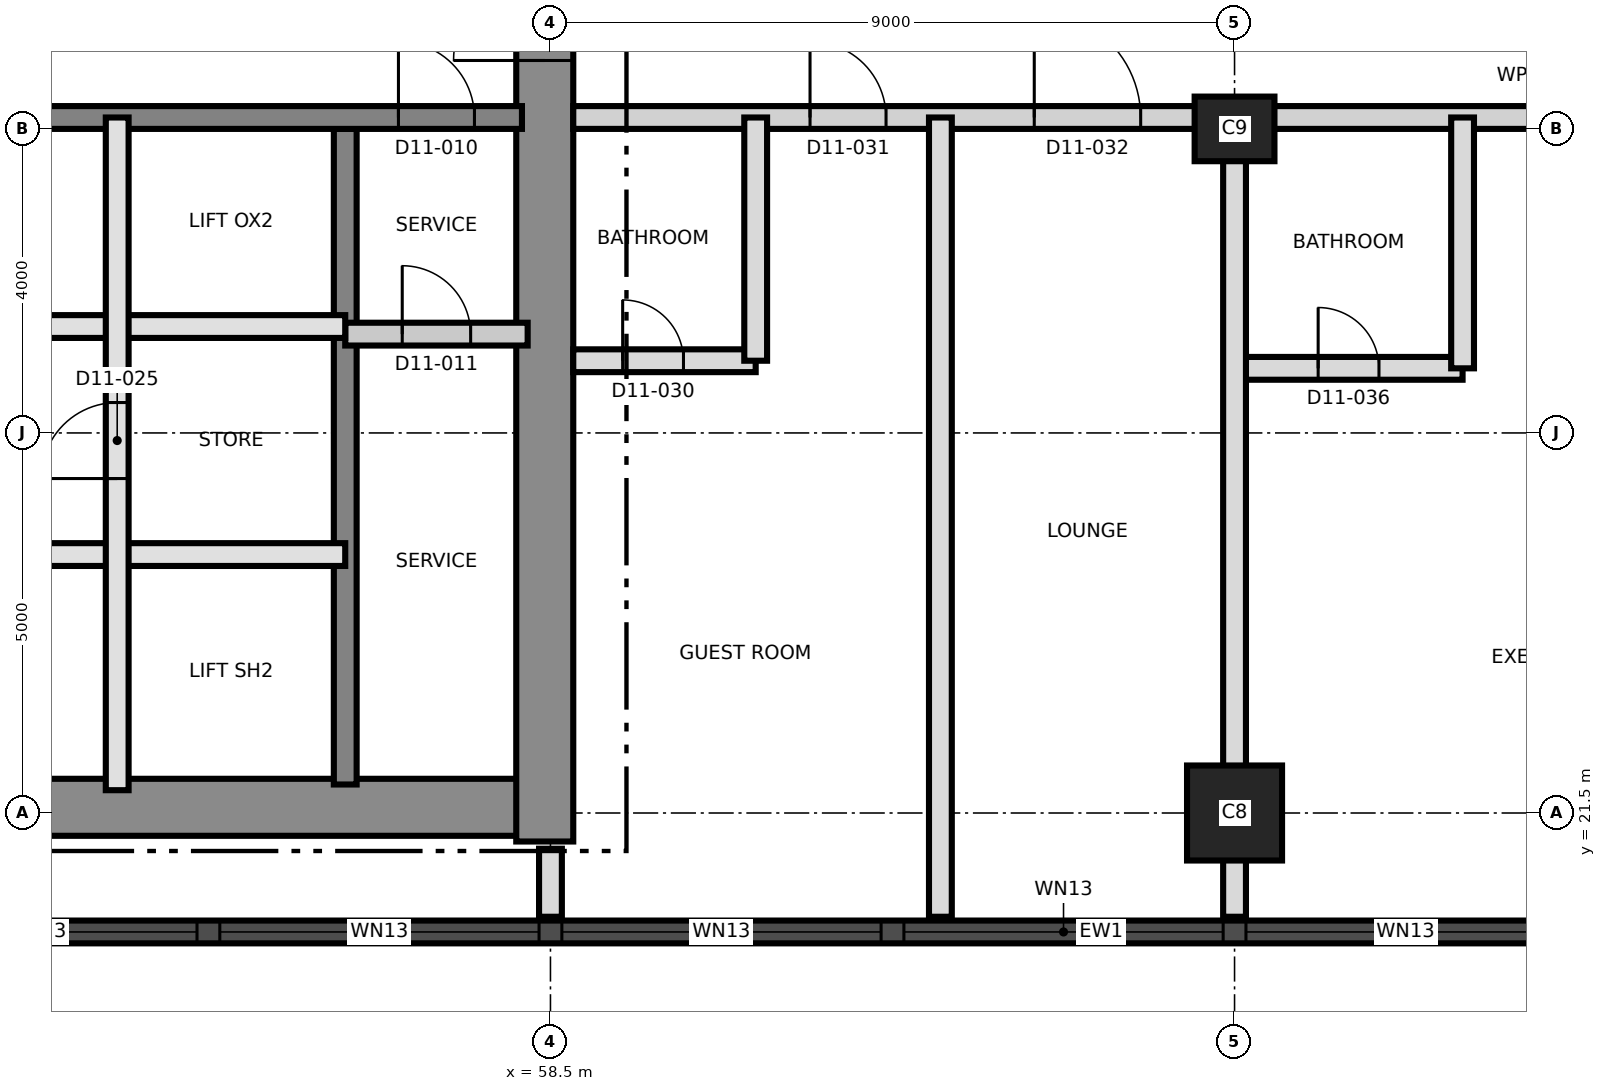
"""IFC4 building model, lengths in metres.
Left out: names, types, materials, properties, quantities, classifications, styles, units other than length and angle.
Written with IfcOpenShell. Run it as: python <this file> out.ifc"""

import sys

from ifc_helpers import new_model, si_unit, direction, frame, frame_2d, origin, origin_2d, place, context, subcontext, project, spatial, rectangle, extrude, element, fill, save


model = new_model("IFC4")
c1 = context("Model", 3, precision=1e-05, world=origin(), true_north=direction((0.0, 1.0)))
c2 = subcontext(c1, "Body", "Model", "MODEL_VIEW")
j1 = project(units=[si_unit("LENGTHUNIT", "METRE"), si_unit("PLANEANGLEUNIT", "RADIAN")], contexts=[c1])
p1 = place(None, origin())
s1 = spatial("IfcSite", under=j1, at=p1, CompositionType="ELEMENT")
p2 = place(p1, origin())
s2 = spatial("IfcBuilding", under=s1, at=p2, CompositionType="ELEMENT")
p3 = place(p2, frame((0.0, 0.0, 124.1)))
s3 = spatial("IfcBuildingStorey", under=s2, at=p3, CompositionType="ELEMENT", Elevation=124.1)
p4 = place(p3, frame((31.125, 21.575, 0.0), z_axis=(0.0, 0.0, 1.0), x_axis=(1.0, 0.0, 0.0)))
e1 = element("IfcWall", 1, at=p4, inside=s3, PredefinedType="SHEAR", context=c2, shape_type="SweptSolid", body=[
    extrude(rectangle(XDim=27.0, YDim=0.75, at=frame_2d((13.5, 0.0))), origin(), (0.0, 0.0, 1.0), 3.7),
])
p5 = place(p3, frame((58.425, 21.125, 0.0), z_axis=(0.0, 0.0, 1.0), x_axis=(0.0, 1.0, 0.0)))
e2 = element("IfcWall", 2, at=p5, inside=s3, PredefinedType="SHEAR", context=c2, shape_type="SweptSolid", body=[
    extrude(rectangle(XDim=18.75, YDim=0.75, at=frame_2d((9.375, 0.0))), origin(), (0.0, 0.0, 1.0), 3.7),
])
p6 = place(p5, frame((10.275, 0.0, 0.0)))
e3 = element("IfcOpeningElement", 3, at=p6, cuts=e2, PredefinedType="OPENING", context=c2, shape_type="SweptSolid", body=[
    extrude(rectangle(XDim=1.2, YDim=2.1, at=frame_2d((0.6, 1.05))), frame((0.0, 0.385, 0.0), z_axis=(0.0, -1.0, 0.0), x_axis=(1.0, 0.0, 0.0)), (0.0, 0.0, 1.0), 0.77),
])
p7 = place(p3, frame((55.8, 21.875, 0.0), z_axis=(0.0, 0.0, 1.0), x_axis=(0.0, 1.0, 0.0)))
e4 = element("IfcWall", 4, at=p7, inside=s3, PredefinedType="SHEAR", context=c2, shape_type="SweptSolid", body=[
    extrude(rectangle(XDim=8.625, YDim=0.3, at=frame_2d((4.312, 0.0))), origin(), (0.0, 0.0, 1.0), 3.7),
])
p8 = place(p3, frame((31.875, 30.65, 0.0), z_axis=(0.0, 0.0, 1.0), x_axis=(1.0, 0.0, 0.0)))
e5 = element("IfcWall", 5, at=p8, inside=s3, PredefinedType="SHEAR", context=c2, shape_type="SweptSolid", body=[
    extrude(rectangle(XDim=26.25, YDim=0.3, at=frame_2d((13.125, 0.0))), origin(), (0.0, 0.0, 1.0), 3.7),
])
p9 = place(p8, frame((24.625, 0.0, 0.0)))
e6 = element("IfcOpeningElement", 6, at=p9, cuts=e5, PredefinedType="OPENING", context=c2, shape_type="SweptSolid", body=[
    extrude(rectangle(XDim=1.0, YDim=2.1, at=frame_2d((0.5, 1.05))), frame((0.0, 0.16, 0.0), z_axis=(0.0, -1.0, 0.0), x_axis=(1.0, 0.0, 0.0)), (0.0, 0.0, 1.0), 0.32),
])
p10 = place(p8, frame((11.425, 0.0, 0.0)))
e7 = element("IfcOpeningElement", 7, at=p10, cuts=e5, PredefinedType="OPENING", context=c2, shape_type="SweptSolid", body=[
    extrude(rectangle(XDim=1.0, YDim=2.1, at=frame_2d((0.5, 1.05))), frame((0.0, 0.16, 0.0), z_axis=(0.0, -1.0, 0.0), x_axis=(1.0, 0.0, 0.0)), (0.0, 0.0, 1.0), 0.32),
])
p11 = place(p3, frame((67.5, 21.5, 0.0), z_axis=(0.0, 0.0, 1.0), x_axis=(1.0, 0.0, 0.0)))
e8 = element("IfcColumn", 8, at=p11, inside=s3, PredefinedType="COLUMN", context=c2, shape_type="SweptSolid", body=[
    extrude(rectangle(XDim=1.25, YDim=1.25, at=origin_2d()), origin(), (0.0, 0.0, 1.0), 3.7),
])
p12 = place(p3, frame((67.5, 30.5, 0.0), z_axis=(0.0, 0.0, 1.0), x_axis=(1.0, 0.0, 0.0)))
e9 = element("IfcColumn", 9, at=p12, inside=s3, PredefinedType="COLUMN", context=c2, shape_type="SweptSolid", body=[
    extrude(rectangle(XDim=1.05, YDim=0.85, at=origin_2d()), origin(), (0.0, 0.0, 1.0), 3.7),
])
p13 = place(p3, frame((44.01, 19.935, 0.0), z_axis=(0.0, 0.0, 1.0), x_axis=(1.0, 0.0, 0.0)))
e10 = element("IfcWall", 10, at=p13, inside=s3, PredefinedType="SOLIDWALL", context=c2, shape_type="SweptSolid", body=[
    extrude(rectangle(XDim=43.477, YDim=0.3, at=frame_2d((21.738, 0.0))), origin(), (0.0, 0.0, 1.0), 3.4),
])
p14 = place(p13, frame((1.845, 0.0, 0.3)))
e11 = element("IfcOpeningElement", 11, at=p14, cuts=e10, PredefinedType="OPENING", context=c2, shape_type="SweptSolid", body=[
    extrude(rectangle(XDim=1.8, YDim=2.4, at=frame_2d((0.9, 1.2))), frame((0.0, 0.16, 0.0), z_axis=(0.0, -1.0, 0.0), x_axis=(1.0, 0.0, 0.0)), (0.0, 0.0, 1.0), 0.32),
])
p15 = place(p13, frame((5.64, 0.0, 0.9)))
e12 = element("IfcOpeningElement", 12, at=p15, cuts=e10, PredefinedType="OPENING", context=c2, shape_type="SweptSolid", body=[
    extrude(rectangle(XDim=4.2, YDim=1.7, at=frame_2d((2.1, 0.85))), frame((0.0, 0.16, 0.0), z_axis=(0.0, -1.0, 0.0), x_axis=(1.0, 0.0, 0.0)), (0.0, 0.0, 1.0), 0.32),
])
p16 = place(p13, frame((10.14, 0.0, 0.9)))
e13 = element("IfcOpeningElement", 13, at=p16, cuts=e10, PredefinedType="OPENING", context=c2, shape_type="SweptSolid", body=[
    extrude(rectangle(XDim=4.2, YDim=1.7, at=frame_2d((2.1, 0.85))), frame((0.0, 0.16, 0.0), z_axis=(0.0, -1.0, 0.0), x_axis=(1.0, 0.0, 0.0)), (0.0, 0.0, 1.0), 0.32),
])
p17 = place(p13, frame((14.64, 0.0, 0.9)))
e14 = element("IfcOpeningElement", 14, at=p17, cuts=e10, PredefinedType="OPENING", context=c2, shape_type="SweptSolid", body=[
    extrude(rectangle(XDim=4.2, YDim=1.7, at=frame_2d((2.1, 0.85))), frame((0.0, 0.16, 0.0), z_axis=(0.0, -1.0, 0.0), x_axis=(1.0, 0.0, 0.0)), (0.0, 0.0, 1.0), 0.32),
])
p18 = place(p13, frame((19.14, 0.0, 0.9)))
e15 = element("IfcOpeningElement", 15, at=p18, cuts=e10, PredefinedType="OPENING", context=c2, shape_type="SweptSolid", body=[
    extrude(rectangle(XDim=4.2, YDim=1.7, at=frame_2d((2.1, 0.85))), frame((0.0, 0.16, 0.0), z_axis=(0.0, -1.0, 0.0), x_axis=(1.0, 0.0, 0.0)), (0.0, 0.0, 1.0), 0.32),
])
p19 = place(p13, frame((23.64, 0.0, 0.9)))
e16 = element("IfcOpeningElement", 16, at=p19, cuts=e10, PredefinedType="OPENING", context=c2, shape_type="SweptSolid", body=[
    extrude(rectangle(XDim=4.2, YDim=1.7, at=frame_2d((2.1, 0.85))), frame((0.0, 0.16, 0.0), z_axis=(0.0, -1.0, 0.0), x_axis=(1.0, 0.0, 0.0)), (0.0, 0.0, 1.0), 0.32),
])
p20 = place(p13, frame((28.14, 0.0, 0.9)))
e17 = element("IfcOpeningElement", 17, at=p20, cuts=e10, PredefinedType="OPENING", context=c2, shape_type="SweptSolid", body=[
    extrude(rectangle(XDim=4.2, YDim=1.7, at=frame_2d((2.1, 0.85))), frame((0.0, 0.16, 0.0), z_axis=(0.0, -1.0, 0.0), x_axis=(1.0, 0.0, 0.0)), (0.0, 0.0, 1.0), 0.32),
])
p21 = place(p13, frame((32.64, 0.0, 0.9)))
e18 = element("IfcOpeningElement", 18, at=p21, cuts=e10, PredefinedType="OPENING", context=c2, shape_type="SweptSolid", body=[
    extrude(rectangle(XDim=4.2, YDim=1.7, at=frame_2d((2.1, 0.85))), frame((0.0, 0.16, 0.0), z_axis=(0.0, -1.0, 0.0), x_axis=(1.0, 0.0, 0.0)), (0.0, 0.0, 1.0), 0.32),
])
p22 = place(p13, frame((37.14, 0.0, 0.9)))
e19 = element("IfcOpeningElement", 19, at=p22, cuts=e10, PredefinedType="OPENING", context=c2, shape_type="SweptSolid", body=[
    extrude(rectangle(XDim=4.2, YDim=1.7, at=frame_2d((2.1, 0.85))), frame((0.0, 0.16, 0.0), z_axis=(0.0, -1.0, 0.0), x_axis=(1.0, 0.0, 0.0)), (0.0, 0.0, 1.0), 0.32),
])
p23 = place(p3, frame((46.8, 24.9, 0.0), z_axis=(0.0, 0.0, 1.0), x_axis=(1.0, 0.0, 0.0)))
e20 = element("IfcWall", 20, at=p23, inside=s3, PredefinedType="SOLIDWALL", context=c2, shape_type="SweptSolid", body=[
    extrude(rectangle(XDim=9.0, YDim=0.3, at=frame_2d((4.5, 0.0))), origin(), (0.0, 0.0, 1.0), 3.4),
])
p24 = place(p23, frame((1.75, 0.0, 0.0)))
e21 = element("IfcOpeningElement", 21, at=p24, cuts=e20, PredefinedType="OPENING", context=c2, shape_type="SweptSolid", body=[
    extrude(rectangle(XDim=0.9, YDim=2.1, at=frame_2d((0.45, 1.05))), frame((0.0, 0.16, 0.0), z_axis=(0.0, -1.0, 0.0), x_axis=(1.0, 0.0, 0.0)), (0.0, 0.0, 1.0), 0.32),
])
p25 = place(p3, frame((55.8, 27.8, 0.0), z_axis=(0.0, 0.0, 1.0), x_axis=(1.0, 0.0, 0.0)))
e22 = element("IfcWall", 22, at=p25, inside=s3, PredefinedType="PARTITIONING", context=c2, shape_type="SweptSolid", body=[
    extrude(rectangle(XDim=2.4, YDim=0.3, at=frame_2d((1.2, 0.0))), origin(), (0.0, 0.0, 1.0), 3.4),
])
p26 = place(p25, frame((0.75, 0.0, 0.0)))
e23 = element("IfcOpeningElement", 23, at=p26, cuts=e22, PredefinedType="OPENING", context=c2, shape_type="SweptSolid", body=[
    extrude(rectangle(XDim=0.9, YDim=2.1, at=frame_2d((0.45, 1.05))), frame((0.0, 0.16, 0.0), z_axis=(0.0, -1.0, 0.0), x_axis=(1.0, 0.0, 0.0)), (0.0, 0.0, 1.0), 0.32),
])
p27 = place(p3, frame((49.8, 27.9, 0.0), z_axis=(0.0, 0.0, 1.0), x_axis=(1.0, 0.0, 0.0)))
e24 = element("IfcWall", 24, at=p27, inside=s3, PredefinedType="SOLIDWALL", context=c2, shape_type="SweptSolid", body=[
    extrude(rectangle(XDim=6.0, YDim=0.3, at=frame_2d((3.0, 0.0))), origin(), (0.0, 0.0, 1.0), 3.4),
])
p28 = place(p3, frame((52.8, 21.8, 0.0), z_axis=(0.0, 0.0, 1.0), x_axis=(0.0, 1.0, 0.0)))
e25 = element("IfcWall", 25, at=p28, inside=s3, PredefinedType="SOLIDWALL", context=c2, shape_type="SweptSolid", body=[
    extrude(rectangle(XDim=8.85, YDim=0.3, at=frame_2d((4.425, 0.0))), origin(), (0.0, 0.0, 1.0), 3.4),
])
p29 = place(p28, frame((4.1, 0.0, 0.0)))
e26 = element("IfcOpeningElement", 26, at=p29, cuts=e25, PredefinedType="OPENING", context=c2, shape_type="SweptSolid", body=[
    extrude(rectangle(XDim=1.0, YDim=2.1, at=frame_2d((0.5, 1.05))), frame((0.0, 0.16, 0.0), z_axis=(0.0, -1.0, 0.0), x_axis=(1.0, 0.0, 0.0)), (0.0, 0.0, 1.0), 0.32),
])
p30 = place(p3, frame((67.5, 27.35, 0.0), z_axis=(0.0, 0.0, 1.0), x_axis=(1.0, 0.0, 0.0)))
e27 = element("IfcWall", 27, at=p30, inside=s3, PredefinedType="PARTITIONING", context=c2, shape_type="SweptSolid", body=[
    extrude(rectangle(XDim=3.0, YDim=0.3, at=frame_2d((1.5, 0.0))), origin(), (0.0, 0.0, 1.0), 3.4),
])
p31 = place(p30, frame((1.1, 0.0, 0.0)))
e28 = element("IfcOpeningElement", 28, at=p31, cuts=e27, PredefinedType="OPENING", context=c2, shape_type="SweptSolid", body=[
    extrude(rectangle(XDim=0.8, YDim=2.1, at=frame_2d((0.4, 1.05))), frame((0.0, 0.16, 0.0), z_axis=(0.0, -1.0, 0.0), x_axis=(1.0, 0.0, 0.0)), (0.0, 0.0, 1.0), 0.32),
])
p32 = place(p3, frame((58.8, 27.45, 0.0), z_axis=(0.0, 0.0, 1.0), x_axis=(1.0, 0.0, 0.0)))
e29 = element("IfcWall", 29, at=p32, inside=s3, PredefinedType="PARTITIONING", context=c2, shape_type="SweptSolid", body=[
    extrude(rectangle(XDim=2.4, YDim=0.3, at=frame_2d((1.2, 0.0))), origin(), (0.0, 0.0, 1.0), 3.4),
])
p33 = place(p32, frame((0.65, 0.0, 0.0)))
e30 = element("IfcOpeningElement", 30, at=p33, cuts=e29, PredefinedType="OPENING", context=c2, shape_type="SweptSolid", body=[
    extrude(rectangle(XDim=0.8, YDim=2.1, at=frame_2d((0.4, 1.05))), frame((0.0, 0.16, 0.0), z_axis=(0.0, -1.0, 0.0), x_axis=(1.0, 0.0, 0.0)), (0.0, 0.0, 1.0), 0.32),
])
p34 = place(p3, frame((58.8, 30.65, 0.0), z_axis=(0.0, 0.0, 1.0), x_axis=(1.0, 0.0, 0.0)))
e31 = element("IfcWall", 31, at=p34, inside=s3, PredefinedType="PARTITIONING", context=c2, shape_type="SweptSolid", body=[
    extrude(rectangle(XDim=26.53, YDim=0.3, at=frame_2d((13.265, 0.0))), origin(), (0.0, 0.0, 1.0), 3.4),
])
p35 = place(p34, frame((3.115, 0.0, 0.0)))
e32 = element("IfcOpeningElement", 32, at=p35, cuts=e31, PredefinedType="OPENING", context=c2, shape_type="SweptSolid", body=[
    extrude(rectangle(XDim=1.0, YDim=2.1, at=frame_2d((0.5, 1.05))), frame((0.0, 0.16, 0.0), z_axis=(0.0, -1.0, 0.0), x_axis=(1.0, 0.0, 0.0)), (0.0, 0.0, 1.0), 0.32),
])
p36 = place(p34, frame((6.065, 0.0, 0.0)))
e33 = element("IfcOpeningElement", 33, at=p36, cuts=e31, PredefinedType="OPENING", context=c2, shape_type="SweptSolid", body=[
    extrude(rectangle(XDim=1.4, YDim=2.1, at=frame_2d((0.7, 1.05))), frame((0.0, 0.16, 0.0), z_axis=(0.0, -1.0, 0.0), x_axis=(1.0, 0.0, 0.0)), (0.0, 0.0, 1.0), 0.32),
])
p37 = place(p34, frame((12.7, 0.0, 0.0)))
e34 = element("IfcOpeningElement", 34, at=p37, cuts=e31, PredefinedType="OPENING", context=c2, shape_type="SweptSolid", body=[
    extrude(rectangle(XDim=1.0, YDim=2.4, at=frame_2d((0.5, 1.2))), frame((0.0, 0.16, 0.0), z_axis=(0.0, -1.0, 0.0), x_axis=(1.0, 0.0, 0.0)), (0.0, 0.0, 1.0), 0.32),
])
p38 = place(p34, frame((18.85, 0.0, 0.0)))
e35 = element("IfcOpeningElement", 35, at=p38, cuts=e31, PredefinedType="OPENING", context=c2, shape_type="SweptSolid", body=[
    extrude(rectangle(XDim=1.0, YDim=2.1, at=frame_2d((0.5, 1.05))), frame((0.0, 0.16, 0.0), z_axis=(0.0, -1.0, 0.0), x_axis=(1.0, 0.0, 0.0)), (0.0, 0.0, 1.0), 0.32),
])
p39 = place(p34, frame((24.7, 0.0, 0.0)))
e36 = element("IfcOpeningElement", 36, at=p39, cuts=e31, PredefinedType="OPENING", context=c2, shape_type="SweptSolid", body=[
    extrude(rectangle(XDim=1.0, YDim=2.1, at=frame_2d((0.5, 1.05))), frame((0.0, 0.16, 0.0), z_axis=(0.0, -1.0, 0.0), x_axis=(1.0, 0.0, 0.0)), (0.0, 0.0, 1.0), 0.32),
])
p40 = place(p3, frame((58.5, 20.135, 0.0), z_axis=(0.0, 0.0, 1.0), x_axis=(0.0, 1.0, 0.0)))
e37 = element("IfcWall", 37, at=p40, inside=s3, PredefinedType="PARTITIONING", context=c2, shape_type="SweptSolid", body=[
    extrude(rectangle(XDim=0.895, YDim=0.3, at=frame_2d((0.448, 0.0))), origin(), (0.0, 0.0, 1.0), 3.4),
])
p41 = place(p3, frame((61.2, 27.45, 0.0), z_axis=(0.0, 0.0, 1.0), x_axis=(0.0, 1.0, 0.0)))
e38 = element("IfcWall", 38, at=p41, inside=s3, PredefinedType="PARTITIONING", context=c2, shape_type="SweptSolid", body=[
    extrude(rectangle(XDim=3.2, YDim=0.3, at=frame_2d((1.6, 0.0))), origin(), (0.0, 0.0, 1.0), 3.4),
])
for number, where, z_axis, x_axis in (
    (39, (63.63, 20.135, 0.0), (0.0, 0.0, 1.0), (0.0, 1.0, 0.0)),
    (40, (67.5, 20.135, 0.0), (0.0, 0.0, 1.0), (0.0, 1.0, 0.0)),
):
    element("IfcWall", number, at=place(p3, frame(where, z_axis=z_axis, x_axis=x_axis)), inside=s3, PredefinedType="PARTITIONING", context=c2, shape_type="SweptSolid", body=[
        extrude(rectangle(XDim=10.515, YDim=0.3, at=frame_2d((5.257, 0.0))), origin(), (0.0, 0.0, 1.0), 3.4),
    ])
p42 = place(p3, frame((70.5, 27.35, 0.0), z_axis=(0.0, 0.0, 1.0), x_axis=(0.0, 1.0, 0.0)))
e41 = element("IfcWall", 41, at=p42, inside=s3, PredefinedType="PARTITIONING", context=c2, shape_type="SweptSolid", body=[
    extrude(rectangle(XDim=3.3, YDim=0.3, at=frame_2d((1.65, 0.0))), origin(), (0.0, 0.0, 1.0), 3.4),
])
p43 = place(p15, origin())
e42 = element("IfcWindow", 42, at=p43, inside=s3, PartitioningType="SINGLE_PANEL", PredefinedType="WINDOW", context=c2, shape_type="SweptSolid", body=[
    extrude(rectangle(XDim=4.2, YDim=1.7, at=frame_2d((2.1, 0.85))), frame((0.0, 0.03, 0.0), z_axis=(0.0, -1.0, 0.0), x_axis=(1.0, 0.0, 0.0)), (0.0, 0.0, 1.0), 0.06),
])
fill(e12, e42)
p44 = place(p16, origin())
e43 = element("IfcWindow", 43, at=p44, inside=s3, PartitioningType="SINGLE_PANEL", PredefinedType="WINDOW", context=c2, shape_type="SweptSolid", body=[
    extrude(rectangle(XDim=4.2, YDim=1.7, at=frame_2d((2.1, 0.85))), frame((0.0, 0.03, 0.0), z_axis=(0.0, -1.0, 0.0), x_axis=(1.0, 0.0, 0.0)), (0.0, 0.0, 1.0), 0.06),
])
fill(e13, e43)
p45 = place(p17, origin())
e44 = element("IfcWindow", 44, at=p45, inside=s3, PartitioningType="SINGLE_PANEL", PredefinedType="WINDOW", context=c2, shape_type="SweptSolid", body=[
    extrude(rectangle(XDim=4.2, YDim=1.7, at=frame_2d((2.1, 0.85))), frame((0.0, 0.03, 0.0), z_axis=(0.0, -1.0, 0.0), x_axis=(1.0, 0.0, 0.0)), (0.0, 0.0, 1.0), 0.06),
])
fill(e14, e44)
p46 = place(p18, origin())
e45 = element("IfcWindow", 45, at=p46, inside=s3, PartitioningType="SINGLE_PANEL", PredefinedType="WINDOW", context=c2, shape_type="SweptSolid", body=[
    extrude(rectangle(XDim=4.2, YDim=1.7, at=frame_2d((2.1, 0.85))), frame((0.0, 0.03, 0.0), z_axis=(0.0, -1.0, 0.0), x_axis=(1.0, 0.0, 0.0)), (0.0, 0.0, 1.0), 0.06),
])
fill(e15, e45)
p47 = place(p19, origin())
e46 = element("IfcWindow", 46, at=p47, inside=s3, PartitioningType="SINGLE_PANEL", PredefinedType="WINDOW", context=c2, shape_type="SweptSolid", body=[
    extrude(rectangle(XDim=4.2, YDim=1.7, at=frame_2d((2.1, 0.85))), frame((0.0, 0.03, 0.0), z_axis=(0.0, -1.0, 0.0), x_axis=(1.0, 0.0, 0.0)), (0.0, 0.0, 1.0), 0.06),
])
fill(e16, e46)
p48 = place(p9, origin())
e47 = element("IfcDoor", 47, at=p48, inside=s3, OperationType="SINGLE_SWING_LEFT", PredefinedType="DOOR", context=c2, shape_type="SweptSolid", body=[
    extrude(rectangle(XDim=1.0, YDim=2.1, at=frame_2d((0.5, 1.05))), frame((0.0, 0.025, 0.0), z_axis=(0.0, -1.0, 0.0), x_axis=(1.0, 0.0, 0.0)), (0.0, 0.0, 1.0), 0.05),
])
fill(e6, e47)
p49 = place(p26, origin())
e48 = element("IfcDoor", 48, at=p49, inside=s3, OperationType="SINGLE_SWING_RIGHT", PredefinedType="DOOR", context=c2, shape_type="SweptSolid", body=[
    extrude(rectangle(XDim=0.9, YDim=2.1, at=frame_2d((0.45, 1.05))), frame((0.0, 0.025, 0.0), z_axis=(0.0, -1.0, 0.0), x_axis=(1.0, 0.0, 0.0)), (0.0, 0.0, 1.0), 0.05),
])
fill(e23, e48)
p50 = place(p6, origin())
e49 = element("IfcDoor", 49, at=p50, inside=s3, OperationType="SINGLE_SWING_LEFT", PredefinedType="DOOR", context=c2, shape_type="SweptSolid", body=[
    extrude(rectangle(XDim=1.2, YDim=2.1, at=frame_2d((0.6, 1.05))), frame((0.0, 0.025, 0.0), z_axis=(0.0, -1.0, 0.0), x_axis=(1.0, 0.0, 0.0)), (0.0, 0.0, 1.0), 0.05),
])
fill(e3, e49)
p51 = place(p29, origin())
e50 = element("IfcDoor", 50, at=p51, inside=s3, OperationType="SINGLE_SWING_RIGHT", PredefinedType="DOOR", context=c2, shape_type="SweptSolid", body=[
    extrude(rectangle(XDim=1.0, YDim=2.1, at=frame_2d((0.5, 1.05))), frame((0.0, 0.025, 0.0), z_axis=(0.0, -1.0, 0.0), x_axis=(1.0, 0.0, 0.0)), (0.0, 0.0, 1.0), 0.05),
])
fill(e26, e50)
p52 = place(p33, origin())
e51 = element("IfcDoor", 51, at=p52, inside=s3, OperationType="SINGLE_SWING_LEFT", PredefinedType="DOOR", context=c2, shape_type="SweptSolid", body=[
    extrude(rectangle(XDim=0.8, YDim=2.1, at=frame_2d((0.4, 1.05))), frame((0.0, 0.025, 0.0), z_axis=(0.0, -1.0, 0.0), x_axis=(1.0, 0.0, 0.0)), (0.0, 0.0, 1.0), 0.05),
])
fill(e30, e51)
p53 = place(p35, origin())
e52 = element("IfcDoor", 52, at=p53, inside=s3, OperationType="SINGLE_SWING_LEFT", PredefinedType="DOOR", context=c2, shape_type="SweptSolid", body=[
    extrude(rectangle(XDim=1.0, YDim=2.1, at=frame_2d((0.5, 1.05))), frame((0.0, 0.025, 0.0), z_axis=(0.0, -1.0, 0.0), x_axis=(1.0, 0.0, 0.0)), (0.0, 0.0, 1.0), 0.05),
])
fill(e32, e52)
p54 = place(p36, origin())
e53 = element("IfcDoor", 53, at=p54, inside=s3, OperationType="SINGLE_SWING_RIGHT", PredefinedType="DOOR", context=c2, shape_type="SweptSolid", body=[
    extrude(rectangle(XDim=1.4, YDim=2.1, at=frame_2d((0.7, 1.05))), frame((0.0, 0.025, 0.0), z_axis=(0.0, -1.0, 0.0), x_axis=(1.0, 0.0, 0.0)), (0.0, 0.0, 1.0), 0.05),
])
fill(e33, e53)
p55 = place(p31, origin())
e54 = element("IfcDoor", 54, at=p55, inside=s3, OperationType="SINGLE_SWING_LEFT", PredefinedType="DOOR", context=c2, shape_type="SweptSolid", body=[
    extrude(rectangle(XDim=0.8, YDim=2.1, at=frame_2d((0.4, 1.05))), frame((0.0, 0.025, 0.0), z_axis=(0.0, -1.0, 0.0), x_axis=(1.0, 0.0, 0.0)), (0.0, 0.0, 1.0), 0.05),
])
fill(e28, e54)
save(model, sys.argv[1])
